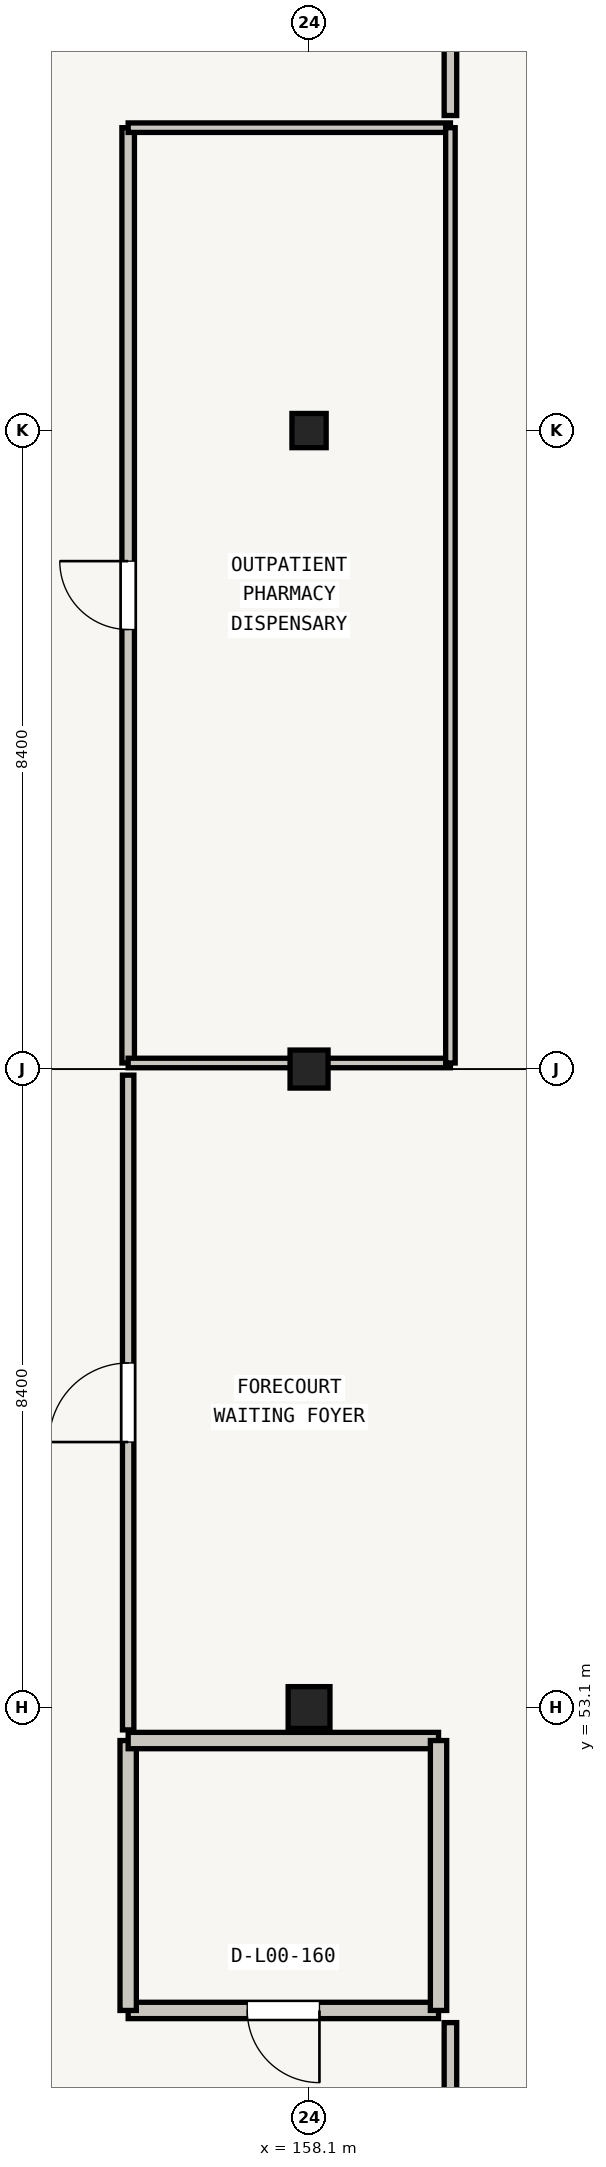
"""IFC4 building model, lengths in metres.
Left out: names, types, materials, properties, quantities, classifications, styles, units other than length and angle.
Written with IfcOpenShell. Run it as: python <this file> out.ifc"""

import sys

from ifc_helpers import new_model, si_unit, direction, frame, frame_2d, origin, origin_2d, place, context, subcontext, project, spatial, rectangle, extrude, element, fill, save


model = new_model("IFC4")
c1 = context("Model", 3, precision=1e-05, world=origin(), true_north=direction((0.0, 1.0)))
c2 = subcontext(c1, "Body", "Model", "MODEL_VIEW")
j1 = project(units=[si_unit("LENGTHUNIT", "METRE"), si_unit("PLANEANGLEUNIT", "RADIAN")], contexts=[c1])
p1 = place(None, origin())
s1 = spatial("IfcSite", under=j1, at=p1, CompositionType="ELEMENT")
p2 = place(p1, origin())
s2 = spatial("IfcBuilding", under=s1, at=p2, CompositionType="ELEMENT")
p3 = place(p2, origin())
s3 = spatial("IfcBuildingStorey", under=s2, at=p3, CompositionType="ELEMENT", Elevation=0.0)
p4 = place(p3, frame((158.1, 53.1, 0.0), z_axis=(0.0, 0.0, 1.0), x_axis=(1.0, 0.0, 0.0)))
e1 = element("IfcColumn", 1, at=p4, inside=s3, PredefinedType="COLUMN", context=c2, shape_type="SweptSolid", body=[
    extrude(rectangle(XDim=0.55, YDim=0.55, at=origin_2d()), origin(), (0.0, 0.0, 1.0), 4.25),
])
p5 = place(p3, frame((158.1, 61.5, 0.0), z_axis=(0.0, 0.0, 1.0), x_axis=(1.0, 0.0, 0.0)))
e2 = element("IfcColumn", 2, at=p5, inside=s3, PredefinedType="COLUMN", context=c2, shape_type="SweptSolid", body=[
    extrude(rectangle(XDim=0.5, YDim=0.5, at=origin_2d()), origin(), (0.0, 0.0, 1.0), 4.25),
])
p6 = place(p3, frame((158.1, 69.9, 0.0), z_axis=(0.0, 0.0, 1.0), x_axis=(1.0, 0.0, 0.0)))
e3 = element("IfcColumn", 3, at=p6, inside=s3, PredefinedType="COLUMN", context=c2, shape_type="SweptSolid", body=[
    extrude(rectangle(XDim=0.45, YDim=0.45, at=origin_2d()), origin(), (0.0, 0.0, 1.0), 4.25),
])
p7 = place(p3, frame((159.803, 49.115, 0.0), z_axis=(0.0, 0.0, 1.0), x_axis=(-1.0, 0.0, 0.0)))
e4 = element("IfcWall", 4, at=p7, inside=s3, PredefinedType="PLUMBINGWALL", context=c2, shape_type="SweptSolid", body=[
    extrude(rectangle(XDim=4.083, YDim=0.215, at=frame_2d((2.042, 0.0))), origin(), (0.0, 0.0, 1.0), 3.27),
])
p8 = place(p7, frame((1.567, 0.0, 0.0)))
e5 = element("IfcOpeningElement", 5, at=p8, cuts=e4, PredefinedType="OPENING", context=c2, shape_type="SweptSolid", body=[
    extrude(rectangle(XDim=0.95, YDim=2.05, at=frame_2d((0.475, 1.025))), frame((0.0, 0.107, 0.0), z_axis=(0.0, -1.0, 0.0), x_axis=(1.0, 0.0, 0.0)), (0.0, 0.0, 1.0), 0.215),
])
p9 = place(p3, frame((155.72, 49.115, 0.0), z_axis=(0.0, 0.0, 1.0), x_axis=(0.0, 1.0, 0.0)))
e6 = element("IfcWall", 6, at=p9, inside=s3, PredefinedType="PLUMBINGWALL", context=c2, shape_type="SweptSolid", body=[
    extrude(rectangle(XDim=3.551, YDim=0.215, at=frame_2d((1.775, 0.0))), origin(), (0.0, 0.0, 1.0), 3.27),
])
p10 = place(p3, frame((155.72, 52.666, 0.0), z_axis=(0.0, 0.0, 1.0), x_axis=(1.0, 0.0, 0.0)))
e7 = element("IfcWall", 7, at=p10, inside=s3, PredefinedType="PLUMBINGWALL", context=c2, shape_type="SweptSolid", body=[
    extrude(rectangle(XDim=4.083, YDim=0.215, at=frame_2d((2.042, 0.0))), origin(), (0.0, 0.0, 1.0), 3.27),
])
p11 = place(p3, frame((159.803, 52.666, 0.0), z_axis=(0.0, 0.0, 1.0), x_axis=(0.0, -1.0, 0.0)))
e8 = element("IfcWall", 8, at=p11, inside=s3, PredefinedType="PLUMBINGWALL", context=c2, shape_type="SweptSolid", body=[
    extrude(rectangle(XDim=3.551, YDim=0.215, at=frame_2d((1.775, 0.0))), origin(), (0.0, 0.0, 1.0), 3.27),
])
p12 = place(p3, frame((155.72, 61.58, 0.0), z_axis=(0.0, 0.0, 1.0), x_axis=(0.0, 1.0, 0.0)))
e9 = element("IfcWall", 9, at=p12, inside=s3, PredefinedType="PARTITIONING", context=c2, shape_type="SweptSolid", body=[
    extrude(rectangle(XDim=12.305, YDim=0.165, at=frame_2d((6.152, 0.0))), origin(), (0.0, 0.0, 1.0), 3.27),
])
p13 = place(p12, frame((5.702, 0.0, 0.0)))
e10 = element("IfcOpeningElement", 10, at=p13, cuts=e9, PredefinedType="OPENING", context=c2, shape_type="SweptSolid", body=[
    extrude(rectangle(XDim=0.9, YDim=2.05, at=frame_2d((0.45, 1.025))), frame((0.0, 0.083, 0.0), z_axis=(0.0, -1.0, 0.0), x_axis=(1.0, 0.0, 0.0)), (0.0, 0.0, 1.0), 0.165),
])
for number, where, z_axis, x_axis in (
    (11, (159.96, 61.58, 0.0), (0.0, 0.0, 1.0), (-1.0, 0.0, 0.0)),
    (12, (155.72, 73.885, 0.0), (0.0, 0.0, 1.0), (1.0, 0.0, 0.0)),
):
    element("IfcWall", number, at=place(p3, frame(where, z_axis=z_axis, x_axis=x_axis)), inside=s3, PredefinedType="PARTITIONING", context=c2, shape_type="SweptSolid", body=[
        extrude(rectangle(XDim=4.24, YDim=0.125, at=frame_2d((2.12, 0.0))), origin(), (0.0, 0.0, 1.0), 3.27),
    ])
p14 = place(p3, frame((159.96, 73.885, 0.0), z_axis=(0.0, 0.0, 1.0), x_axis=(0.0, -1.0, 0.0)))
e13 = element("IfcWall", 13, at=p14, inside=s3, PredefinedType="PARTITIONING", context=c2, shape_type="SweptSolid", body=[
    extrude(rectangle(XDim=12.305, YDim=0.125, at=frame_2d((6.152, 0.0))), origin(), (0.0, 0.0, 1.0), 3.27),
])
p15 = place(p3, frame((159.96, 79.4, 0.0), z_axis=(0.0, 0.0, 1.0), x_axis=(0.0, -1.0, 0.0)))
e14 = element("IfcWall", 14, at=p15, inside=s3, PredefinedType="PARTITIONING", context=c2, shape_type="SweptSolid", body=[
    extrude(rectangle(XDim=5.355, YDim=0.165, at=frame_2d((2.677, 0.0))), origin(), (0.0, 0.0, 1.0), 3.27),
])
p16 = place(p15, frame((1.903, 0.0, 0.0)))
e15 = element("IfcOpeningElement", 15, at=p16, cuts=e14, PredefinedType="OPENING", context=c2, shape_type="SweptSolid", body=[
    extrude(rectangle(XDim=1.55, YDim=2.1, at=frame_2d((0.775, 1.05))), frame((0.0, 0.083, 0.0), z_axis=(0.0, -1.0, 0.0), x_axis=(1.0, 0.0, 0.0)), (0.0, 0.0, 1.0), 0.165),
])
p17 = place(p3, frame((155.72, 52.806, 0.0), z_axis=(0.0, 0.0, 1.0), x_axis=(0.0, 1.0, 0.0)))
e16 = element("IfcWall", 16, at=p17, inside=s3, PredefinedType="PARTITIONING", context=c2, shape_type="SweptSolid", body=[
    extrude(rectangle(XDim=8.614, YDim=0.15, at=frame_2d((4.307, 0.0))), origin(), (0.0, 0.0, 1.0), 3.27),
])
p18 = place(p17, frame((3.787, 0.0, 0.0)))
e17 = element("IfcOpeningElement", 17, at=p18, cuts=e16, PredefinedType="OPENING", context=c2, shape_type="SweptSolid", body=[
    extrude(rectangle(XDim=1.04, YDim=2.05, at=frame_2d((0.52, 1.025))), frame((0.0, 0.075, 0.0), z_axis=(0.0, -1.0, 0.0), x_axis=(1.0, 0.0, 0.0)), (0.0, 0.0, 1.0), 0.15),
])
p19 = place(p3, frame((159.96, 48.955, 0.0), z_axis=(0.0, 0.0, 1.0), x_axis=(0.0, -1.0, 0.0)))
e18 = element("IfcWall", 18, at=p19, inside=s3, PredefinedType="PARTITIONING", context=c2, shape_type="SweptSolid", body=[
    extrude(rectangle(XDim=3.905, YDim=0.165, at=frame_2d((1.953, 0.0))), origin(), (0.0, 0.0, 1.0), 3.27),
])
p20 = place(p19, frame((1.502, 0.0, 0.0)))
e19 = element("IfcOpeningElement", 19, at=p20, cuts=e18, PredefinedType="OPENING", context=c2, shape_type="SweptSolid", body=[
    extrude(rectangle(XDim=0.9, YDim=2.05, at=frame_2d((0.45, 1.025))), frame((0.0, 0.083, 0.0), z_axis=(0.0, -1.0, 0.0), x_axis=(1.0, 0.0, 0.0)), (0.0, 0.0, 1.0), 0.165),
])
p21 = place(p8, origin())
e20 = element("IfcDoor", 20, at=p21, inside=s3, OperationType="SINGLE_SWING_LEFT", PredefinedType="DOOR", context=c2, shape_type="SweptSolid", body=[
    extrude(rectangle(XDim=0.95, YDim=2.05, at=frame_2d((0.475, 1.025))), frame((0.0, 0.025, 0.0), z_axis=(0.0, -1.0, 0.0), x_axis=(1.0, 0.0, 0.0)), (0.0, 0.0, 1.0), 0.05),
])
fill(e5, e20)
p22 = place(p13, origin())
e21 = element("IfcDoor", 21, at=p22, inside=s3, OperationType="SINGLE_SWING_RIGHT", PredefinedType="DOOR", context=c2, shape_type="SweptSolid", body=[
    extrude(rectangle(XDim=0.9, YDim=2.05, at=frame_2d((0.45, 1.025))), frame((0.0, 0.025, 0.0), z_axis=(0.0, -1.0, 0.0), x_axis=(1.0, 0.0, 0.0)), (0.0, 0.0, 1.0), 0.05),
])
fill(e10, e21)
p23 = place(p18, origin())
e22 = element("IfcDoor", 22, at=p23, inside=s3, OperationType="SINGLE_SWING_LEFT", PredefinedType="DOOR", context=c2, shape_type="SweptSolid", body=[
    extrude(rectangle(XDim=1.04, YDim=2.05, at=frame_2d((0.52, 1.025))), frame((0.0, 0.025, 0.0), z_axis=(0.0, -1.0, 0.0), x_axis=(1.0, 0.0, 0.0)), (0.0, 0.0, 1.0), 0.05),
])
fill(e17, e22)
save(model, sys.argv[1])
